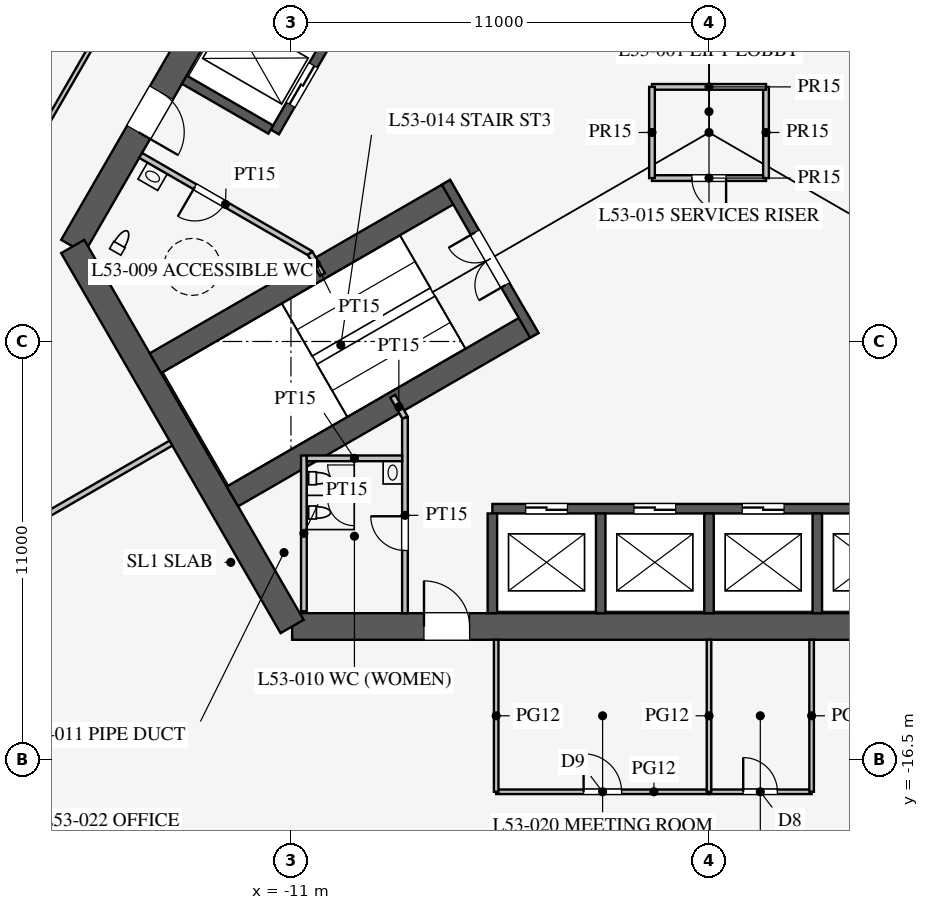
"""IFC4 building model, lengths in metres.
Left out: names, types, materials, properties, quantities, classifications, styles, units other than length and angle.
Written with IfcOpenShell. Run it as: python <this file> out.ifc"""

import sys

from ifc_helpers import new_model, si_unit, direction, frame, frame_2d, origin, place, context, subcontext, project, spatial, rectangle, extrude, element, fill, save


model = new_model("IFC4")
c1 = context("Model", 3, precision=1e-05, world=origin(), true_north=direction((0.0, 1.0)))
c2 = subcontext(c1, "Body", "Model", "MODEL_VIEW")
j1 = project(units=[si_unit("LENGTHUNIT", "METRE"), si_unit("PLANEANGLEUNIT", "RADIAN")], contexts=[c1])
p1 = place(None, origin())
s1 = spatial("IfcSite", under=j1, at=p1, CompositionType="ELEMENT")
p2 = place(p1, origin())
s2 = spatial("IfcBuilding", under=s1, at=p2, CompositionType="ELEMENT")
p3 = place(p2, frame((0.0, 0.0, 231.7)))
s3 = spatial("IfcBuildingStorey", under=s2, at=p3, CompositionType="ELEMENT", Elevation=231.7)
p4 = place(p3, frame((-10.97, -13.0, 0.0), z_axis=(0.0, 0.0, 1.0), x_axis=(1.0, 0.0, 0.0)))
e1 = element("IfcWall", 1, at=p4, inside=s3, PredefinedType="SHEAR", context=c2, shape_type="SweptSolid", body=[
    extrude(rectangle(XDim=21.939, YDim=0.7, at=frame_2d((10.97, 0.0))), origin(), (0.0, 0.0, 1.0), 4.2),
])
p5 = place(p4, frame((17.27, 0.0, 0.0)))
e2 = element("IfcOpeningElement", 2, at=p5, cuts=e1, PredefinedType="OPENING", context=c2, shape_type="SweptSolid", body=[
    extrude(rectangle(XDim=1.2, YDim=2.1, at=frame_2d((0.6, 1.05))), frame((0.0, 0.36, 0.0), z_axis=(0.0, -1.0, 0.0), x_axis=(1.0, 0.0, 0.0)), (0.0, 0.0, 1.0), 0.72),
])
p6 = place(p4, frame((3.47, 0.0, 0.0)))
e3 = element("IfcOpeningElement", 3, at=p6, cuts=e1, PredefinedType="OPENING", context=c2, shape_type="SweptSolid", body=[
    extrude(rectangle(XDim=1.2, YDim=2.1, at=frame_2d((0.6, 1.05))), frame((0.0, 0.36, 0.0), z_axis=(0.0, -1.0, 0.0), x_axis=(1.0, 0.0, 0.0)), (0.0, 0.0, 1.0), 0.72),
])
p7 = place(p3, frame((-5.773, 16.0, 0.0), z_axis=(0.0, 0.0, 1.0), x_axis=(-0.500002442456, -0.866023993627, 0.0)))
e4 = element("IfcWall", 4, at=p7, inside=s3, PredefinedType="SHEAR", context=c2, shape_type="SweptSolid", body=[
    extrude(rectangle(XDim=21.939, YDim=0.7, at=frame_2d((10.97, 0.0))), origin(), (0.0, 0.0, 1.0), 4.2),
])
p8 = place(p7, frame((17.27, 0.0, 0.0)))
e5 = element("IfcOpeningElement", 5, at=p8, cuts=e4, PredefinedType="OPENING", context=c2, shape_type="SweptSolid", body=[
    extrude(rectangle(XDim=1.2, YDim=2.1, at=frame_2d((0.6, 1.05))), frame((0.0, 0.36, 0.0), z_axis=(0.0, -1.0, 0.0), x_axis=(1.0, 0.0, 0.0)), (0.0, 0.0, 1.0), 0.72),
])
p9 = place(p7, frame((3.47, 0.0, 0.0)))
e6 = element("IfcOpeningElement", 6, at=p9, cuts=e4, PredefinedType="OPENING", context=c2, shape_type="SweptSolid", body=[
    extrude(rectangle(XDim=1.2, YDim=2.1, at=frame_2d((0.6, 1.05))), frame((0.0, 0.36, 0.0), z_axis=(0.0, -1.0, 0.0), x_axis=(1.0, 0.0, 0.0)), (0.0, 0.0, 1.0), 0.72),
])
p10 = place(p3, frame((-16.743, -3.0, 0.0), z_axis=(0.0, 0.0, 1.0), x_axis=(0.499995765644, -0.866027848477, 0.0)))
e7 = element("IfcWall", 7, at=p10, inside=s3, PredefinedType="SHEAR", context=c2, shape_type="SweptSolid", body=[
    extrude(rectangle(XDim=11.547, YDim=0.7, at=frame_2d((5.773, 0.0))), origin(), (0.0, 0.0, 1.0), 4.2),
])
p11 = place(p3, frame((-5.7, -9.9, 0.0), z_axis=(0.0, 0.0, 1.0), x_axis=(1.0, 0.0, 0.0)))
e8 = element("IfcWall", 8, at=p11, inside=s3, PredefinedType="SHEAR", context=c2, shape_type="SweptSolid", body=[
    extrude(rectangle(XDim=11.4, YDim=0.25, at=frame_2d((5.7, 0.0))), origin(), (0.0, 0.0, 1.0), 4.2),
])
p12 = place(p11, frame((0.875, 0.0, 0.0)))
e9 = element("IfcOpeningElement", 9, at=p12, cuts=e8, PredefinedType="OPENING", context=c2, shape_type="SweptSolid", body=[
    extrude(rectangle(XDim=1.1, YDim=2.2, at=frame_2d((0.55, 1.1))), frame((0.0, 0.135, 0.0), z_axis=(0.0, -1.0, 0.0), x_axis=(1.0, 0.0, 0.0)), (0.0, 0.0, 1.0), 0.27),
])
p13 = place(p11, frame((3.725, 0.0, 0.0)))
e10 = element("IfcOpeningElement", 10, at=p13, cuts=e8, PredefinedType="OPENING", context=c2, shape_type="SweptSolid", body=[
    extrude(rectangle(XDim=1.1, YDim=2.2, at=frame_2d((0.55, 1.1))), frame((0.0, 0.135, 0.0), z_axis=(0.0, -1.0, 0.0), x_axis=(1.0, 0.0, 0.0)), (0.0, 0.0, 1.0), 0.27),
])
p14 = place(p11, frame((6.575, 0.0, 0.0)))
e11 = element("IfcOpeningElement", 11, at=p14, cuts=e8, PredefinedType="OPENING", context=c2, shape_type="SweptSolid", body=[
    extrude(rectangle(XDim=1.1, YDim=2.2, at=frame_2d((0.55, 1.1))), frame((0.0, 0.135, 0.0), z_axis=(0.0, -1.0, 0.0), x_axis=(1.0, 0.0, 0.0)), (0.0, 0.0, 1.0), 0.27),
])
p15 = place(p11, frame((9.425, 0.0, 0.0)))
e12 = element("IfcOpeningElement", 12, at=p15, cuts=e8, PredefinedType="OPENING", context=c2, shape_type="SweptSolid", body=[
    extrude(rectangle(XDim=1.1, YDim=2.2, at=frame_2d((0.55, 1.1))), frame((0.0, 0.135, 0.0), z_axis=(0.0, -1.0, 0.0), x_axis=(1.0, 0.0, 0.0)), (0.0, 0.0, 1.0), 0.27),
])
for number, where, z_axis, x_axis in (
    (13, (-5.7, -10.025, 0.0), (0.0, 0.0, 1.0), (0.0, -1.0, 0.0)),
    (14, (-2.85, -10.025, 0.0), (0.0, 0.0, 1.0), (0.0, -1.0, 0.0)),
    (15, (0.0, -10.025, 0.0), (0.0, 0.0, 1.0), (0.0, -1.0, 0.0)),
    (16, (2.85, -10.025, 0.0), (0.0, 0.0, 1.0), (0.0, -1.0, 0.0)),
):
    element("IfcWall", number, at=place(p3, frame(where, z_axis=z_axis, x_axis=x_axis)), inside=s3, PredefinedType="SHEAR", context=c2, shape_type="SweptSolid", body=[
        extrude(rectangle(XDim=2.625, YDim=0.25, at=frame_2d((1.312, 0.0))), origin(), (0.0, 0.0, 1.0), 4.2),
    ])
p16 = place(p3, frame((-5.724, 9.886, 0.0), z_axis=(0.0, 0.0, 1.0), x_axis=(-0.500001763848, -0.866024385424, 0.0)))
e17 = element("IfcWall", 17, at=p16, inside=s3, PredefinedType="SHEAR", context=c2, shape_type="SweptSolid", body=[
    extrude(rectangle(XDim=11.4, YDim=0.25, at=frame_2d((5.7, 0.0))), origin(), (0.0, 0.0, 1.0), 4.2),
])
p17 = place(p16, frame((6.525, 0.0, 0.0)))
e18 = element("IfcOpeningElement", 18, at=p17, cuts=e17, PredefinedType="OPENING", context=c2, shape_type="SweptSolid", body=[
    extrude(rectangle(XDim=1.2, YDim=2.2, at=frame_2d((0.6, 1.1))), frame((0.0, 0.135, 0.0), z_axis=(0.0, -1.0, 0.0), x_axis=(1.0, 0.0, 0.0)), (0.0, 0.0, 1.0), 0.27),
])
p18 = place(p16, frame((9.375, 0.0, 0.0)))
e19 = element("IfcOpeningElement", 19, at=p18, cuts=e17, PredefinedType="OPENING", context=c2, shape_type="SweptSolid", body=[
    extrude(rectangle(XDim=1.2, YDim=2.2, at=frame_2d((0.6, 1.1))), frame((0.0, 0.135, 0.0), z_axis=(0.0, -1.0, 0.0), x_axis=(1.0, 0.0, 0.0)), (0.0, 0.0, 1.0), 0.27),
])
p19 = place(p3, frame((-11.532, 0.076, 0.0), z_axis=(0.0, 0.0, 1.0), x_axis=(-0.866013657776, 0.500020344131, 0.0)))
e20 = element("IfcWall", 20, at=p19, inside=s3, PredefinedType="SHEAR", context=c2, shape_type="SweptSolid", body=[
    extrude(rectangle(XDim=2.625, YDim=0.25, at=frame_2d((1.312, 0.0))), origin(), (0.0, 0.0, 1.0), 4.2),
])
for number, where, z_axis, x_axis in (
    (21, (-6.663, -1.509, 0.0), (0.0, 0.0, 1.0), (-0.866, -0.5, 0.0)),
    (22, (-4.638, -5.016, 0.0), (0.0, 0.0, 1.0), (-0.866, -0.5, 0.0)),
):
    element("IfcWall", number, at=place(p3, frame(where, z_axis=z_axis, x_axis=x_axis)), inside=s3, PredefinedType="SHEAR", context=c2, shape_type="SweptSolid", body=[
        extrude(rectangle(XDim=9.125, YDim=0.6, at=frame_2d((4.562, 0.0))), origin(), (0.0, 0.0, 1.0), 4.2),
    ])
p20 = place(p3, frame((-6.922, -1.312, 0.0), z_axis=(0.0, 0.0, 1.0), x_axis=(0.499984536904, -0.866034331223, 0.0)))
e23 = element("IfcWall", 23, at=p20, inside=s3, PredefinedType="SHEAR", context=c2, shape_type="SweptSolid", body=[
    extrude(rectangle(XDim=4.65, YDim=0.25, at=frame_2d((2.325, 0.0))), origin(), (0.0, 0.0, 1.0), 4.2),
])
p21 = place(p20, frame((1.525, 0.0, 0.0)))
e24 = element("IfcOpeningElement", 24, at=p21, cuts=e23, PredefinedType="OPENING", context=c2, shape_type="SweptSolid", body=[
    extrude(rectangle(XDim=1.6, YDim=2.1, at=frame_2d((0.8, 1.05))), frame((0.0, 0.135, 0.0), z_axis=(0.0, -1.0, 0.0), x_axis=(1.0, 0.0, 0.0)), (0.0, 0.0, 1.0), 0.27),
])
p22 = place(p3, frame((-8.0, -7.5, 0.0), z_axis=(0.0, 0.0, 1.0), x_axis=(0.0, -1.0, 0.0)))
e25 = element("IfcWall", 25, at=p22, inside=s3, PredefinedType="PARTITIONING", context=c2, shape_type="SweptSolid", body=[
    extrude(rectangle(XDim=5.15, YDim=0.15, at=frame_2d((2.575, 0.0))), origin(), (0.0, 0.0, 1.0), 4.0),
])
p23 = place(p22, frame((2.6, 0.0, 0.0)))
e26 = element("IfcOpeningElement", 26, at=p23, cuts=e25, PredefinedType="OPENING", context=c2, shape_type="SweptSolid", body=[
    extrude(rectangle(XDim=0.9, YDim=2.1, at=frame_2d((0.45, 1.05))), frame((0.0, 0.085, 0.0), z_axis=(0.0, -1.0, 0.0), x_axis=(1.0, 0.0, 0.0)), (0.0, 0.0, 1.0), 0.17),
])
p24 = place(p3, frame((-10.495, -3.178, 0.0), z_axis=(0.0, 0.0, 1.0), x_axis=(-0.866037967349, 0.499978238636, 0.0)))
e27 = element("IfcWall", 27, at=p24, inside=s3, PredefinedType="PARTITIONING", context=c2, shape_type="SweptSolid", body=[
    extrude(rectangle(XDim=5.15, YDim=0.15, at=frame_2d((2.575, 0.0))), origin(), (0.0, 0.0, 1.0), 4.0),
])
p25 = place(p24, frame((2.6, 0.0, 0.0)))
e28 = element("IfcOpeningElement", 28, at=p25, cuts=e27, PredefinedType="OPENING", context=c2, shape_type="SweptSolid", body=[
    extrude(rectangle(XDim=0.9, YDim=2.1, at=frame_2d((0.45, 1.05))), frame((0.0, 0.085, 0.0), z_axis=(0.0, -1.0, 0.0), x_axis=(1.0, 0.0, 0.0)), (0.0, 0.0, 1.0), 0.17),
])
for number, where, z_axis, x_axis in (
    (29, (-10.495, -3.178, 0.0), (0.0, 0.0, 1.0), (0.5, -0.866, 0.0)),
    (30, (-8.0, -7.5, 0.0), (0.0, 0.0, 1.0), (-0.5, 0.866, 0.0)),
):
    element("IfcWall", number, at=place(p3, frame(where, z_axis=z_axis, x_axis=x_axis)), inside=s3, PredefinedType="PARTITIONING", context=c2, shape_type="SweptSolid", body=[
        extrude(rectangle(XDim=0.645, YDim=0.15, at=frame_2d((0.323, 0.0))), origin(), (0.0, 0.0, 1.0), 4.0),
    ])
p26 = place(p3, frame((-10.66, -8.5, 0.0), z_axis=(0.0, 0.0, 1.0), x_axis=(0.0, -1.0, 0.0)))
e31 = element("IfcWall", 31, at=p26, inside=s3, PredefinedType="PARTITIONING", context=c2, shape_type="SweptSolid", body=[
    extrude(rectangle(XDim=4.1, YDim=0.15, at=frame_2d((2.05, 0.0))), origin(), (0.0, 0.0, 1.0), 4.0),
])
p27 = place(p3, frame((-8.075, -8.575, 0.0), z_axis=(0.0, 0.0, 1.0), x_axis=(-1.0, 0.0, 0.0)))
e32 = element("IfcWall", 32, at=p27, inside=s3, PredefinedType="PARTITIONING", context=c2, shape_type="SweptSolid", body=[
    extrude(rectangle(XDim=2.51, YDim=0.15, at=frame_2d((1.255, 0.0))), origin(), (0.0, 0.0, 1.0), 4.0),
])
p28 = place(p3, frame((-1.5, -1.2, 0.0), z_axis=(0.0, 0.0, 1.0), x_axis=(1.0, 0.0, 0.0)))
e33 = element("IfcWall", 33, at=p28, inside=s3, PredefinedType="PARTITIONING", context=c2, shape_type="SweptSolid", body=[
    extrude(rectangle(XDim=3.0, YDim=0.15, at=frame_2d((1.5, 0.0))), origin(), (0.0, 0.0, 1.0), 4.0),
])
p29 = place(p28, frame((1.05, 0.0, 0.0)))
e34 = element("IfcOpeningElement", 34, at=p29, cuts=e33, PredefinedType="OPENING", context=c2, shape_type="SweptSolid", body=[
    extrude(rectangle(XDim=0.9, YDim=2.1, at=frame_2d((0.45, 1.05))), frame((0.0, 0.085, 0.0), z_axis=(0.0, -1.0, 0.0), x_axis=(1.0, 0.0, 0.0)), (0.0, 0.0, 1.0), 0.17),
])
p30 = place(p3, frame((1.5, -1.2, 0.0), z_axis=(0.0, 0.0, 1.0), x_axis=(0.0, 1.0, 0.0)))
e35 = element("IfcWall", 35, at=p30, inside=s3, PredefinedType="PARTITIONING", context=c2, shape_type="SweptSolid", body=[
    extrude(rectangle(XDim=2.4, YDim=0.15, at=frame_2d((1.2, 0.0))), origin(), (0.0, 0.0, 1.0), 4.0),
])
p31 = place(p3, frame((1.5, 1.2, 0.0), z_axis=(0.0, 0.0, 1.0), x_axis=(-1.0, 0.0, 0.0)))
e36 = element("IfcWall", 36, at=p31, inside=s3, PredefinedType="PARTITIONING", context=c2, shape_type="SweptSolid", body=[
    extrude(rectangle(XDim=3.0, YDim=0.15, at=frame_2d((1.5, 0.0))), origin(), (0.0, 0.0, 1.0), 4.0),
])
p32 = place(p3, frame((-1.5, 1.2, 0.0), z_axis=(0.0, 0.0, 1.0), x_axis=(0.0, -1.0, 0.0)))
e37 = element("IfcWall", 37, at=p32, inside=s3, PredefinedType="PARTITIONING", context=c2, shape_type="SweptSolid", body=[
    extrude(rectangle(XDim=2.4, YDim=0.15, at=frame_2d((1.2, 0.0))), origin(), (0.0, 0.0, 1.0), 4.0),
])
p33 = place(p3, frame((-14.159, -8.175, 0.0), z_axis=(0.0, 0.0, 1.0), x_axis=(-0.866027028085, -0.499997186618, 0.0)))
e38 = element("IfcWall", 38, at=p33, inside=s3, PredefinedType="PARTITIONING", context=c2, shape_type="SweptSolid", body=[
    extrude(rectangle(XDim=15.0, YDim=0.15, at=frame_2d((7.5, 0.0))), origin(), (0.0, 0.0, 1.0), 2.4),
])
p34 = place(p3, frame((0.0, -17.35, 0.0), z_axis=(0.0, 0.0, 1.0), x_axis=(1.0, 0.0, 0.0)))
e39 = element("IfcWall", 39, at=p34, inside=s3, PredefinedType="PARTITIONING", context=c2, shape_type="SweptSolid", body=[
    extrude(rectangle(XDim=2.7, YDim=0.12, at=frame_2d((1.35, 0.0))), origin(), (0.0, 0.0, 1.0), 2.9),
])
p35 = place(p34, frame((0.9, 0.0, 0.15)))
e40 = element("IfcOpeningElement", 40, at=p35, cuts=e39, PredefinedType="OPENING", context=c2, shape_type="SweptSolid", body=[
    extrude(rectangle(XDim=0.9, YDim=2.1, at=frame_2d((0.45, 1.05))), frame((0.0, 0.07, 0.0), z_axis=(0.0, -1.0, 0.0), x_axis=(1.0, 0.0, 0.0)), (0.0, 0.0, 1.0), 0.14),
])
p36 = place(p3, frame((-5.6, -17.35, 0.0), z_axis=(0.0, 0.0, 1.0), x_axis=(1.0, 0.0, 0.0)))
e41 = element("IfcWall", 41, at=p36, inside=s3, PredefinedType="PARTITIONING", context=c2, shape_type="SweptSolid", body=[
    extrude(rectangle(XDim=5.6, YDim=0.12, at=frame_2d((2.8, 0.0))), origin(), (0.0, 0.0, 1.0), 2.9),
])
p37 = place(p36, frame((2.3, 0.0, 0.15)))
e42 = element("IfcOpeningElement", 42, at=p37, cuts=e41, PredefinedType="OPENING", context=c2, shape_type="SweptSolid", body=[
    extrude(rectangle(XDim=1.0, YDim=2.1, at=frame_2d((0.5, 1.05))), frame((0.0, 0.07, 0.0), z_axis=(0.0, -1.0, 0.0), x_axis=(1.0, 0.0, 0.0)), (0.0, 0.0, 1.0), 0.14),
])
for number, where, z_axis, x_axis in (
    (43, (2.7, -13.35, 0.0), (0.0, 0.0, 1.0), (0.0, -1.0, 0.0)),
    (44, (0.0, -13.35, 0.0), (0.0, 0.0, 1.0), (0.0, -1.0, 0.0)),
    (45, (-5.6, -13.35, 0.0), (0.0, 0.0, 1.0), (0.0, -1.0, 0.0)),
):
    element("IfcWall", number, at=place(p3, frame(where, z_axis=z_axis, x_axis=x_axis)), inside=s3, PredefinedType="PARTITIONING", context=c2, shape_type="SweptSolid", body=[
        extrude(rectangle(XDim=4.0, YDim=0.12, at=frame_2d((2.0, 0.0))), origin(), (0.0, 0.0, 1.0), 2.9),
    ])
p38 = place(p3, frame((-0.016, 30.392, 0.0), z_axis=(0.0, 0.0, 1.0), x_axis=(-0.500000626146, -0.866025042278, 0.0)))
e46 = element("IfcWall", 46, at=p38, inside=s3, PredefinedType="PARTITIONING", context=c2, shape_type="SweptSolid", body=[
    extrude(rectangle(XDim=52.624, YDim=0.12, at=frame_2d((26.312, 0.0))), origin(), (0.0, 0.0, 1.0), 2.9),
])
p39 = place(p38, frame((10.15, 0.0, 0.15)))
e47 = element("IfcOpeningElement", 47, at=p39, cuts=e46, PredefinedType="OPENING", context=c2, shape_type="SweptSolid", body=[
    extrude(rectangle(XDim=1.8, YDim=2.1, at=frame_2d((0.9, 1.05))), frame((0.0, 0.07, 0.0), z_axis=(0.0, -1.0, 0.0), x_axis=(1.0, 0.0, 0.0)), (0.0, 0.0, 1.0), 0.14),
])
p40 = place(p38, frame((40.65, 0.0, 0.15)))
e48 = element("IfcOpeningElement", 48, at=p40, cuts=e46, PredefinedType="OPENING", context=c2, shape_type="SweptSolid", body=[
    extrude(rectangle(XDim=1.8, YDim=2.1, at=frame_2d((0.9, 1.05))), frame((0.0, 0.07, 0.0), z_axis=(0.0, -1.0, 0.0), x_axis=(1.0, 0.0, 0.0)), (0.0, 0.0, 1.0), 0.14),
])
p41 = place(p23, frame((0.9, 0.0, 0.0), z_axis=(0.0, 0.0, 1.0), x_axis=(-1.0, 0.0, 0.0)))
e49 = element("IfcDoor", 49, at=p41, inside=s3, OperationType="SINGLE_SWING_RIGHT", PredefinedType="DOOR", context=c2, shape_type="SweptSolid", body=[
    extrude(rectangle(XDim=0.9, YDim=2.1, at=frame_2d((0.45, 1.05))), frame((0.0, 0.025, 0.0), z_axis=(0.0, -1.0, 0.0), x_axis=(1.0, 0.0, 0.0)), (0.0, 0.0, 1.0), 0.05),
])
fill(e26, e49)
p42 = place(p25, origin())
e50 = element("IfcDoor", 50, at=p42, inside=s3, OperationType="SINGLE_SWING_RIGHT", PredefinedType="DOOR", context=c2, shape_type="SweptSolid", body=[
    extrude(rectangle(XDim=0.9, YDim=2.1, at=frame_2d((0.45, 1.05))), frame((0.0, 0.025, 0.0), z_axis=(0.0, -1.0, 0.0), x_axis=(1.0, 0.0, 0.0)), (0.0, 0.0, 1.0), 0.05),
])
fill(e28, e50)
p43 = place(p29, frame((0.9, 0.0, 0.0), z_axis=(0.0, 0.0, 1.0), x_axis=(-1.0, 0.0, 0.0)))
e51 = element("IfcDoor", 51, at=p43, inside=s3, OperationType="SINGLE_SWING_LEFT", PredefinedType="DOOR", context=c2, shape_type="SweptSolid", body=[
    extrude(rectangle(XDim=0.9, YDim=2.1, at=frame_2d((0.45, 1.05))), frame((0.0, 0.025, 0.0), z_axis=(0.0, -1.0, 0.0), x_axis=(1.0, 0.0, 0.0)), (0.0, 0.0, 1.0), 0.05),
])
fill(e34, e51)
p44 = place(p21, frame((1.6, 0.0, 0.0), z_axis=(0.0, 0.0, 1.0), x_axis=(-1.0, 0.0, 0.0)))
e52 = element("IfcDoor", 52, at=p44, inside=s3, OperationType="DOUBLE_DOOR_SINGLE_SWING", PredefinedType="DOOR", context=c2, shape_type="SweptSolid", body=[
    extrude(rectangle(XDim=1.6, YDim=2.1, at=frame_2d((0.8, 1.05))), frame((0.0, 0.025, 0.0), z_axis=(0.0, -1.0, 0.0), x_axis=(1.0, 0.0, 0.0)), (0.0, 0.0, 1.0), 0.05),
])
fill(e24, e52)
p45 = place(p6, origin())
e53 = element("IfcDoor", 53, at=p45, inside=s3, OperationType="SINGLE_SWING_LEFT", PredefinedType="DOOR", context=c2, shape_type="SweptSolid", body=[
    extrude(rectangle(XDim=1.2, YDim=2.1, at=frame_2d((0.6, 1.05))), frame((0.0, 0.025, 0.0), z_axis=(0.0, -1.0, 0.0), x_axis=(1.0, 0.0, 0.0)), (0.0, 0.0, 1.0), 0.05),
])
fill(e3, e53)
p46 = place(p8, origin())
e54 = element("IfcDoor", 54, at=p46, inside=s3, OperationType="SINGLE_SWING_RIGHT", PredefinedType="DOOR", context=c2, shape_type="SweptSolid", body=[
    extrude(rectangle(XDim=1.2, YDim=2.1, at=frame_2d((0.6, 1.05))), frame((0.0, 0.025, 0.0), z_axis=(0.0, -1.0, 0.0), x_axis=(1.0, 0.0, 0.0)), (0.0, 0.0, 1.0), 0.05),
])
fill(e5, e54)
p47 = place(p37, origin())
e55 = element("IfcDoor", 55, at=p47, inside=s3, OperationType="SINGLE_SWING_LEFT", PredefinedType="DOOR", context=c2, shape_type="SweptSolid", body=[
    extrude(rectangle(XDim=1.0, YDim=2.1, at=frame_2d((0.5, 1.05))), frame((0.0, 0.025, 0.0), z_axis=(0.0, -1.0, 0.0), x_axis=(1.0, 0.0, 0.0)), (0.0, 0.0, 1.0), 0.05),
])
fill(e42, e55)
p48 = place(p35, origin())
e56 = element("IfcDoor", 56, at=p48, inside=s3, OperationType="SINGLE_SWING_LEFT", PredefinedType="DOOR", context=c2, shape_type="SweptSolid", body=[
    extrude(rectangle(XDim=0.9, YDim=2.1, at=frame_2d((0.45, 1.05))), frame((0.0, 0.025, 0.0), z_axis=(0.0, -1.0, 0.0), x_axis=(1.0, 0.0, 0.0)), (0.0, 0.0, 1.0), 0.05),
])
fill(e40, e56)
p49 = place(p12, origin())
e57 = element("IfcDoor", 57, at=p49, inside=s3, OperationType="DOUBLE_DOOR_SLIDING", PredefinedType="DOOR", context=c2, shape_type="SweptSolid", body=[
    extrude(rectangle(XDim=1.1, YDim=2.2, at=frame_2d((0.55, 1.1))), frame((0.0, 0.025, 0.0), z_axis=(0.0, -1.0, 0.0), x_axis=(1.0, 0.0, 0.0)), (0.0, 0.0, 1.0), 0.05),
])
fill(e9, e57)
p50 = place(p13, origin())
e58 = element("IfcDoor", 58, at=p50, inside=s3, OperationType="DOUBLE_DOOR_SLIDING", PredefinedType="DOOR", context=c2, shape_type="SweptSolid", body=[
    extrude(rectangle(XDim=1.1, YDim=2.2, at=frame_2d((0.55, 1.1))), frame((0.0, 0.025, 0.0), z_axis=(0.0, -1.0, 0.0), x_axis=(1.0, 0.0, 0.0)), (0.0, 0.0, 1.0), 0.05),
])
fill(e10, e58)
p51 = place(p14, origin())
e59 = element("IfcDoor", 59, at=p51, inside=s3, OperationType="DOUBLE_DOOR_SLIDING", PredefinedType="DOOR", context=c2, shape_type="SweptSolid", body=[
    extrude(rectangle(XDim=1.1, YDim=2.2, at=frame_2d((0.55, 1.1))), frame((0.0, 0.025, 0.0), z_axis=(0.0, -1.0, 0.0), x_axis=(1.0, 0.0, 0.0)), (0.0, 0.0, 1.0), 0.05),
])
fill(e11, e59)
p52 = place(p18, origin())
e60 = element("IfcDoor", 60, at=p52, inside=s3, OperationType="DOUBLE_DOOR_SLIDING", PredefinedType="DOOR", context=c2, shape_type="SweptSolid", body=[
    extrude(rectangle(XDim=1.2, YDim=2.2, at=frame_2d((0.6, 1.1))), frame((0.0, 0.025, 0.0), z_axis=(0.0, -1.0, 0.0), x_axis=(1.0, 0.0, 0.0)), (0.0, 0.0, 1.0), 0.05),
])
fill(e19, e60)
save(model, sys.argv[1])
